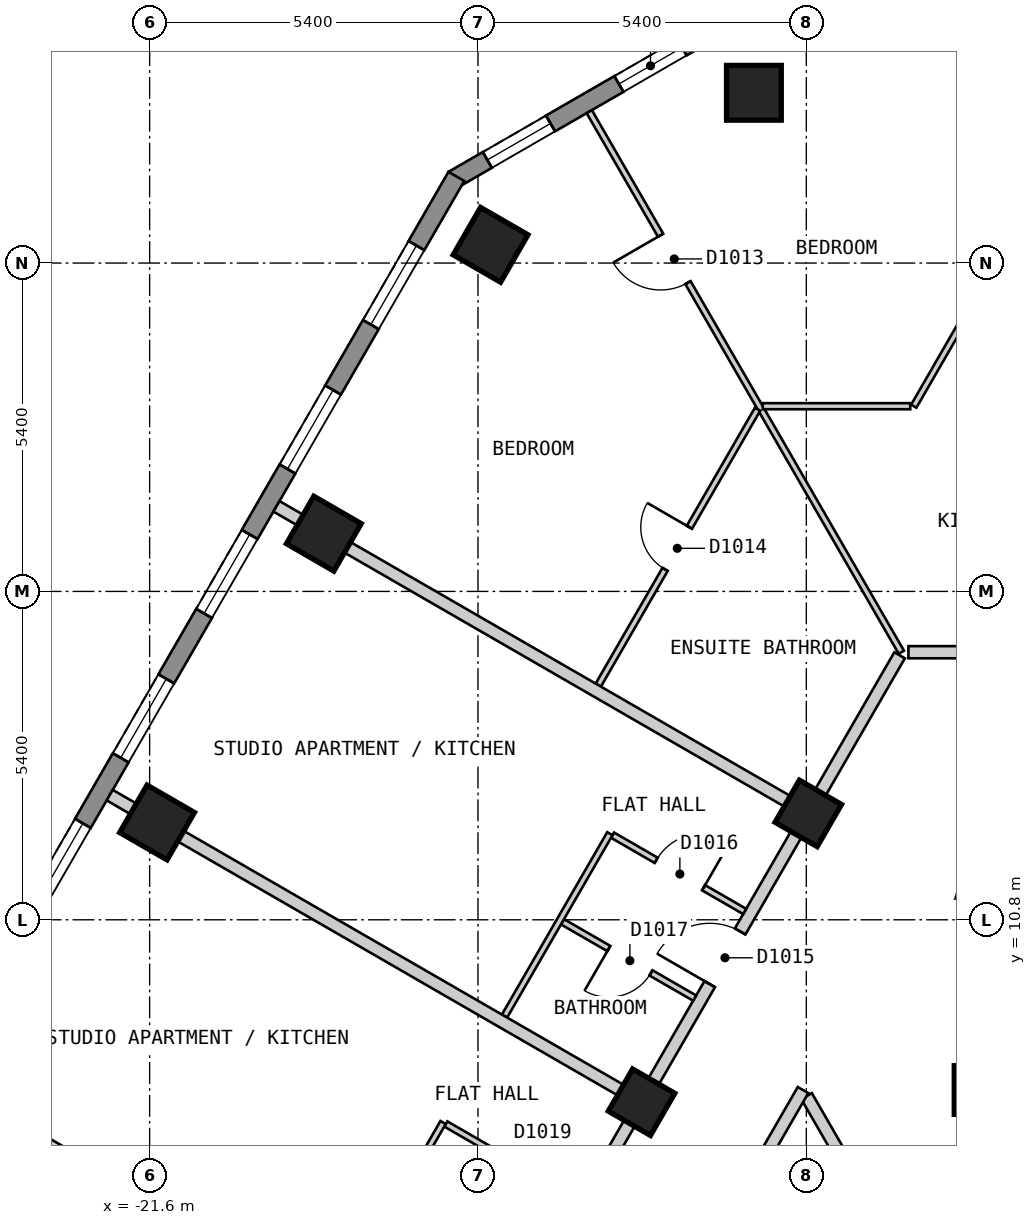
"""IFC4 building model, lengths in metres.
Left out: names, types, materials, properties, quantities, classifications, styles, units other than length and angle.
Written with IfcOpenShell. Run it as: python <this file> out.ifc"""

import sys

from ifc_helpers import new_model, si_unit, direction, frame, frame_2d, origin, origin_2d, place, context, subcontext, project, spatial, polyline, rectangle, outline, extrude, element, fill, save


model = new_model("IFC4")
c1 = context("Model", 3, precision=1e-05, world=origin(), true_north=direction((0.0, 1.0)))
c2 = subcontext(c1, "Body", "Model", "MODEL_VIEW")
j1 = project(units=[si_unit("LENGTHUNIT", "METRE"), si_unit("PLANEANGLEUNIT", "RADIAN")], contexts=[c1])
p1 = place(None, origin())
s1 = spatial("IfcSite", under=j1, at=p1, CompositionType="ELEMENT")
p2 = place(p1, origin())
s2 = spatial("IfcBuilding", under=s1, at=p2, CompositionType="ELEMENT")
p3 = place(p2, frame((0.0, 0.0, 120.6)))
s3 = spatial("IfcBuildingStorey", under=s2, at=p3, CompositionType="ELEMENT", Elevation=120.6)
for number, where, z_axis, x_axis in (
    (1, (-11.662, 24.4, 0.0), (0.0, 0.0, 1.0), (-1.0, 0.0, 0.0)),
    (2, (-15.993, 21.9, 0.0), (0.0, 0.0, 1.0), (-0.5, -0.866, 0.0)),
    (3, (-18.735, 17.15, 0.0), (0.0, 0.0, 1.0), (-0.5, -0.866, 0.0)),
    (4, (-21.478, 12.4, 0.0), (0.0, 0.0, 1.0), (-0.5, -0.866, 0.0)),
):
    element("IfcColumn", number, at=place(p3, frame(where, z_axis=z_axis, x_axis=x_axis)), inside=s3, PredefinedType="COLUMN", context=c2, shape_type="SweptSolid", body=[
        extrude(rectangle(XDim=0.9, YDim=0.9, at=origin_2d()), origin(), (0.0, 0.0, 1.0), 3.0),
    ])
for number, where, z_axis, x_axis in (
    (5, (-10.768, 12.55, 0.0), (0.0, 0.0, 1.0), (-0.5, -0.866, 0.0)),
    (6, (-7.967, 8.0, 0.0), (0.0, 0.0, 1.0), (1.0, 0.0, 0.0)),
    (7, (-13.51, 7.8, 0.0), (0.0, 0.0, 1.0), (-0.5, -0.866, 0.0)),
):
    element("IfcColumn", number, at=place(p3, frame(where, z_axis=z_axis, x_axis=x_axis)), inside=s3, PredefinedType="COLUMN", context=c2, shape_type="SweptSolid", body=[
        extrude(rectangle(XDim=0.8, YDim=0.8, at=origin_2d()), origin(), (0.0, 0.0, 1.0), 3.0),
    ])
p4 = place(p3, frame((-12.28, 25.47, 0.0), z_axis=(0.0, 0.0, 1.0), x_axis=(-0.866022959057, -0.500004234368, 0.0)))
e8 = element("IfcWall", 8, at=p4, inside=s3, PredefinedType="SOLIDWALL", context=c2, shape_type="SweptSolid", body=[
    extrude(outline(polyline([(0.0, -0.15), (5.0, -0.15), (4.92, 0.15), (0.08, 0.15), (0.0, -0.15)])), origin(), (0.0, 0.0, 1.0), 2.7),
])
p5 = place(p4, frame((0.65, 0.0, 0.15)))
e9 = element("IfcOpeningElement", 9, at=p5, cuts=e8, PredefinedType="OPENING", context=c2, shape_type="SweptSolid", body=[
    extrude(rectangle(XDim=1.2, YDim=2.1, at=frame_2d((0.6, 1.05))), frame((0.0, 0.16, 0.0), z_axis=(0.0, -1.0, 0.0), x_axis=(1.0, 0.0, 0.0)), (0.0, 0.0, 1.0), 0.32),
])
p6 = place(p4, frame((3.149, 0.0, 0.15)))
e10 = element("IfcOpeningElement", 10, at=p6, cuts=e8, PredefinedType="OPENING", context=c2, shape_type="SweptSolid", body=[
    extrude(rectangle(XDim=1.2, YDim=2.1, at=frame_2d((0.6, 1.05))), frame((0.0, 0.16, 0.0), z_axis=(0.0, -1.0, 0.0), x_axis=(1.0, 0.0, 0.0)), (0.0, 0.0, 1.0), 0.32),
])
p7 = place(p3, frame((-16.555, 23.025, 0.0), z_axis=(0.0, 0.0, 1.0), x_axis=(-0.500020536353, -0.866013546791, 0.0)))
e11 = element("IfcWall", 11, at=p7, inside=s3, PredefinedType="SOLIDWALL", context=c2, shape_type="SweptSolid", body=[
    extrude(outline(polyline([(0.0, -0.15), (23.325, -0.15), (23.245, 0.15), (0.08, 0.15), (0.0, -0.15)])), origin(), (0.0, 0.0, 1.0), 2.7),
])
p8 = place(p7, frame((1.314, 0.0, 0.15)))
e12 = element("IfcOpeningElement", 12, at=p8, cuts=e11, PredefinedType="OPENING", context=c2, shape_type="SweptSolid", body=[
    extrude(rectangle(XDim=1.5, YDim=2.1, at=frame_2d((0.75, 1.05))), frame((0.0, 0.16, 0.0), z_axis=(0.0, -1.0, 0.0), x_axis=(1.0, 0.0, 0.0)), (0.0, 0.0, 1.0), 0.32),
])
p9 = place(p7, frame((4.056, 0.0, 0.15)))
e13 = element("IfcOpeningElement", 13, at=p9, cuts=e11, PredefinedType="OPENING", context=c2, shape_type="SweptSolid", body=[
    extrude(rectangle(XDim=1.5, YDim=2.1, at=frame_2d((0.75, 1.05))), frame((0.0, 0.16, 0.0), z_axis=(0.0, -1.0, 0.0), x_axis=(1.0, 0.0, 0.0)), (0.0, 0.0, 1.0), 0.32),
])
p10 = place(p7, frame((6.799, 0.0, 0.15)))
e14 = element("IfcOpeningElement", 14, at=p10, cuts=e11, PredefinedType="OPENING", context=c2, shape_type="SweptSolid", body=[
    extrude(rectangle(XDim=1.5, YDim=2.1, at=frame_2d((0.75, 1.05))), frame((0.0, 0.16, 0.0), z_axis=(0.0, -1.0, 0.0), x_axis=(1.0, 0.0, 0.0)), (0.0, 0.0, 1.0), 0.32),
])
p11 = place(p7, frame((9.541, 0.0, 0.15)))
e15 = element("IfcOpeningElement", 15, at=p11, cuts=e11, PredefinedType="OPENING", context=c2, shape_type="SweptSolid", body=[
    extrude(rectangle(XDim=1.5, YDim=2.1, at=frame_2d((0.75, 1.05))), frame((0.0, 0.16, 0.0), z_axis=(0.0, -1.0, 0.0), x_axis=(1.0, 0.0, 0.0)), (0.0, 0.0, 1.0), 0.32),
])
p12 = place(p7, frame((12.285, 0.0, 0.15)))
e16 = element("IfcOpeningElement", 16, at=p12, cuts=e11, PredefinedType="OPENING", context=c2, shape_type="SweptSolid", body=[
    extrude(rectangle(XDim=1.5, YDim=2.1, at=frame_2d((0.75, 1.05))), frame((0.0, 0.16, 0.0), z_axis=(0.0, -1.0, 0.0), x_axis=(1.0, 0.0, 0.0)), (0.0, 0.0, 1.0), 0.32),
])
p13 = place(p7, frame((15.027, 0.0, 0.15)))
e17 = element("IfcOpeningElement", 17, at=p13, cuts=e11, PredefinedType="OPENING", context=c2, shape_type="SweptSolid", body=[
    extrude(rectangle(XDim=1.5, YDim=2.1, at=frame_2d((0.75, 1.05))), frame((0.0, 0.16, 0.0), z_axis=(0.0, -1.0, 0.0), x_axis=(1.0, 0.0, 0.0)), (0.0, 0.0, 1.0), 0.32),
])
p14 = place(p7, frame((17.769, 0.0, 0.15)))
e18 = element("IfcOpeningElement", 18, at=p14, cuts=e11, PredefinedType="OPENING", context=c2, shape_type="SweptSolid", body=[
    extrude(rectangle(XDim=1.5, YDim=2.1, at=frame_2d((0.75, 1.05))), frame((0.0, 0.16, 0.0), z_axis=(0.0, -1.0, 0.0), x_axis=(1.0, 0.0, 0.0)), (0.0, 0.0, 1.0), 0.32),
])
p15 = place(p7, frame((20.512, 0.0, 0.15)))
e19 = element("IfcOpeningElement", 19, at=p15, cuts=e11, PredefinedType="OPENING", context=c2, shape_type="SweptSolid", body=[
    extrude(rectangle(XDim=1.5, YDim=2.1, at=frame_2d((0.75, 1.05))), frame((0.0, 0.16, 0.0), z_axis=(0.0, -1.0, 0.0), x_axis=(1.0, 0.0, 0.0)), (0.0, 0.0, 1.0), 0.32),
])
p16 = place(p3, frame((-10.796, 7.9, 0.0), z_axis=(0.0, 0.0, 1.0), x_axis=(0.499954271211, -0.866051803703, 0.0)))
e20 = element("IfcWall", 20, at=p16, inside=s3, PredefinedType="PARTITIONING", context=c2, shape_type="SweptSolid", body=[
    extrude(rectangle(XDim=7.536, YDim=0.2, at=frame_2d((3.768, 0.0))), origin(), (0.0, 0.0, 1.0), 2.7),
])
p17 = place(p3, frame((-9.121, 15.2, 0.0), z_axis=(0.0, 0.0, 1.0), x_axis=(1.0, 0.0, 0.0)))
e21 = element("IfcWall", 21, at=p17, inside=s3, PredefinedType="PARTITIONING", context=c2, shape_type="SweptSolid", body=[
    extrude(rectangle(XDim=2.308, YDim=0.2, at=frame_2d((1.154, 0.0))), origin(), (0.0, 0.0, 1.0), 2.7),
])
p18 = place(p3, frame((-15.242, 0.399, 0.0), z_axis=(0.0, 0.0, 1.0), x_axis=(0.499953615651, 0.866052182145, 0.0)))
e22 = element("IfcWall", 22, at=p18, inside=s3, PredefinedType="PARTITIONING", context=c2, shape_type="SweptSolid", body=[
    extrude(rectangle(XDim=8.777, YDim=0.2, at=frame_2d((4.388, 0.0))), origin(), (0.0, 0.0, 1.0), 2.7),
])
p19 = place(p18, frame((3.938, 0.0, 0.0)))
e23 = element("IfcOpeningElement", 23, at=p19, cuts=e22, PredefinedType="OPENING", context=c2, shape_type="SweptSolid", body=[
    extrude(rectangle(XDim=0.9, YDim=2.1, at=frame_2d((0.45, 1.05))), frame((0.0, 0.11, 0.0), z_axis=(0.0, -1.0, 0.0), x_axis=(1.0, 0.0, 0.0)), (0.0, 0.0, 1.0), 0.22),
])
p20 = place(p3, frame((-17.753, 0.45, 0.0), z_axis=(0.0, 0.0, 1.0), x_axis=(0.499990970252, 0.866030617049, 0.0)))
e24 = element("IfcWall", 24, at=p20, inside=s3, PredefinedType="PARTITIONING", context=c2, shape_type="SweptSolid", body=[
    extrude(rectangle(XDim=16.974, YDim=0.2, at=frame_2d((8.487, 0.0))), origin(), (0.0, 0.0, 1.0), 2.7),
])
p21 = place(p20, frame((10.73, 0.0, 0.0)))
e25 = element("IfcOpeningElement", 25, at=p21, cuts=e24, PredefinedType="OPENING", context=c2, shape_type="SweptSolid", body=[
    extrude(rectangle(XDim=1.0, YDim=2.1, at=frame_2d((0.5, 1.05))), frame((0.0, 0.11, 0.0), z_axis=(0.0, -1.0, 0.0), x_axis=(1.0, 0.0, 0.0)), (0.0, 0.0, 1.0), 0.22),
])
p22 = place(p20, frame((5.245, 0.0, 0.0)))
e26 = element("IfcOpeningElement", 26, at=p22, cuts=e24, PredefinedType="OPENING", context=c2, shape_type="SweptSolid", body=[
    extrude(rectangle(XDim=1.0, YDim=2.1, at=frame_2d((0.5, 1.05))), frame((0.0, 0.11, 0.0), z_axis=(0.0, -1.0, 0.0), x_axis=(1.0, 0.0, 0.0)), (0.0, 0.0, 1.0), 0.22),
])
p23 = place(p20, frame((0.594, 0.0, 0.0)))
e27 = element("IfcOpeningElement", 27, at=p23, cuts=e24, PredefinedType="OPENING", context=c2, shape_type="SweptSolid", body=[
    extrude(rectangle(XDim=1.0, YDim=2.1, at=frame_2d((0.5, 1.05))), frame((0.0, 0.11, 0.0), z_axis=(0.0, -1.0, 0.0), x_axis=(1.0, 0.0, 0.0)), (0.0, 0.0, 1.0), 0.22),
])
p24 = place(p3, frame((-14.37, 24.09, 0.0), z_axis=(0.0, 0.0, 1.0), x_axis=(0.50002438799, -0.866011322914, 0.0)))
e28 = element("IfcWall", 28, at=p24, inside=s3, PredefinedType="PARTITIONING", context=c2, shape_type="SweptSolid", body=[
    extrude(rectangle(XDim=10.266, YDim=0.1, at=frame_2d((5.133, 0.0))), origin(), (0.0, 0.0, 1.0), 2.7),
])
p25 = place(p24, frame((2.347, 0.0, 0.0)))
e29 = element("IfcOpeningElement", 29, at=p25, cuts=e28, PredefinedType="OPENING", context=c2, shape_type="SweptSolid", body=[
    extrude(rectangle(XDim=0.9, YDim=2.1, at=frame_2d((0.45, 1.05))), frame((0.0, 0.06, 0.0), z_axis=(0.0, -1.0, 0.0), x_axis=(1.0, 0.0, 0.0)), (0.0, 0.0, 1.0), 0.12),
])
p26 = place(p3, frame((-16.729, 7.442, 0.0), z_axis=(0.0, 0.0, 1.0), x_axis=(0.865983051302, -0.500073349477, 0.0)))
e30 = element("IfcWall", 30, at=p26, inside=s3, PredefinedType="PARTITIONING", context=c2, shape_type="SweptSolid", body=[
    extrude(rectangle(XDim=2.509, YDim=0.1, at=frame_2d((1.255, 0.0))), origin(), (0.0, 0.0, 1.0), 2.7),
])
p27 = place(p26, frame((0.829, 0.0, 0.0)))
e31 = element("IfcOpeningElement", 31, at=p27, cuts=e30, PredefinedType="OPENING", context=c2, shape_type="SweptSolid", body=[
    extrude(rectangle(XDim=0.9, YDim=2.1, at=frame_2d((0.45, 1.05))), frame((0.0, 0.06, 0.0), z_axis=(0.0, -1.0, 0.0), x_axis=(1.0, 0.0, 0.0)), (0.0, 0.0, 1.0), 0.12),
])
p28 = place(p3, frame((-13.987, 12.192, 0.0), z_axis=(0.0, 0.0, 1.0), x_axis=(0.865983051302, -0.500073349477, 0.0)))
e32 = element("IfcWall", 32, at=p28, inside=s3, PredefinedType="PARTITIONING", context=c2, shape_type="SweptSolid", body=[
    extrude(rectangle(XDim=2.509, YDim=0.1, at=frame_2d((1.255, 0.0))), origin(), (0.0, 0.0, 1.0), 2.7),
])
p29 = place(p28, frame((0.829, 0.0, 0.0)))
e33 = element("IfcOpeningElement", 33, at=p29, cuts=e32, PredefinedType="OPENING", context=c2, shape_type="SweptSolid", body=[
    extrude(rectangle(XDim=0.9, YDim=2.1, at=frame_2d((0.45, 1.05))), frame((0.0, 0.06, 0.0), z_axis=(0.0, -1.0, 0.0), x_axis=(1.0, 0.0, 0.0)), (0.0, 0.0, 1.0), 0.12),
])
p30 = place(p3, frame((-14.81, 10.767, 0.0), z_axis=(0.0, 0.0, 1.0), x_axis=(0.866038211682, -0.499977815414, 0.0)))
e34 = element("IfcWall", 34, at=p30, inside=s3, PredefinedType="PARTITIONING", context=c2, shape_type="SweptSolid", body=[
    extrude(rectangle(XDim=2.51, YDim=0.1, at=frame_2d((1.255, 0.0))), origin(), (0.0, 0.0, 1.0), 2.7),
])
p31 = place(p30, frame((0.88, 0.0, 0.0)))
e35 = element("IfcOpeningElement", 35, at=p31, cuts=e34, PredefinedType="OPENING", context=c2, shape_type="SweptSolid", body=[
    extrude(rectangle(XDim=0.8, YDim=2.1, at=frame_2d((0.4, 1.05))), frame((0.0, 0.06, 0.0), z_axis=(0.0, -1.0, 0.0), x_axis=(1.0, 0.0, 0.0)), (0.0, 0.0, 1.0), 0.12),
])
p32 = place(p3, frame((-11.516, 19.246, 0.0), z_axis=(0.0, 0.0, 1.0), x_axis=(1.0, 0.0, 0.0)))
e36 = element("IfcWall", 36, at=p32, inside=s3, PredefinedType="PARTITIONING", context=c2, shape_type="SweptSolid", body=[
    extrude(rectangle(XDim=2.425, YDim=0.1, at=frame_2d((1.212, 0.0))), origin(), (0.0, 0.0, 1.0), 2.7),
])
p33 = place(p3, frame((-9.033, 19.246, 0.0), z_axis=(0.0, 0.0, 1.0), x_axis=(0.499963722229, 0.866046347752, 0.0)))
e37 = element("IfcWall", 37, at=p33, inside=s3, PredefinedType="PARTITIONING", context=c2, shape_type="SweptSolid", body=[
    extrude(rectangle(XDim=2.54, YDim=0.1, at=frame_2d((1.27, 0.0))), origin(), (0.0, 0.0, 1.0), 2.7),
])
p34 = place(p3, frame((-18.506, 4.466, 0.0), z_axis=(0.0, 0.0, 1.0), x_axis=(0.500027479704, 0.866009537788, 0.0)))
e38 = element("IfcWall", 38, at=p34, inside=s3, PredefinedType="PARTITIONING", context=c2, shape_type="SweptSolid", body=[
    extrude(rectangle(XDim=3.464, YDim=0.1, at=frame_2d((1.732, 0.0))), origin(), (0.0, 0.0, 1.0), 2.7),
])
p35 = place(p3, frame((-15.763, 9.217, 0.0), z_axis=(0.0, 0.0, 1.0), x_axis=(0.500096714907, 0.865969558206, 0.0)))
e39 = element("IfcWall", 39, at=p35, inside=s3, PredefinedType="PARTITIONING", context=c2, shape_type="SweptSolid", body=[
    extrude(rectangle(XDim=3.463, YDim=0.1, at=frame_2d((1.731, 0.0))), origin(), (0.0, 0.0, 1.0), 2.7),
])
p36 = place(p3, frame((-14.222, 14.659, 0.0), z_axis=(0.0, 0.0, 1.0), x_axis=(0.500053212623, 0.865994679283, 0.0)))
e40 = element("IfcWall", 40, at=p36, inside=s3, PredefinedType="PARTITIONING", context=c2, shape_type="SweptSolid", body=[
    extrude(rectangle(XDim=5.239, YDim=0.1, at=frame_2d((2.62, 0.0))), origin(), (0.0, 0.0, 1.0), 2.7),
])
p37 = place(p36, frame((2.198, 0.0, 0.0)))
e41 = element("IfcOpeningElement", 41, at=p37, cuts=e40, PredefinedType="OPENING", context=c2, shape_type="SweptSolid", body=[
    extrude(rectangle(XDim=0.8, YDim=2.1, at=frame_2d((0.4, 1.05))), frame((0.0, 0.06, 0.0), z_axis=(0.0, -1.0, 0.0), x_axis=(1.0, 0.0, 0.0)), (0.0, 0.0, 1.0), 0.12),
])
p38 = place(p3, frame((-24.999, 8.1, 0.0), z_axis=(0.0, 0.0, 1.0), x_axis=(0.866016855193, -0.500014806302, 0.0)))
e42 = element("IfcWall", 42, at=p38, inside=s3, PredefinedType="PARTITIONING", context=c2, shape_type="SweptSolid", body=[
    extrude(rectangle(XDim=10.0, YDim=0.2, at=frame_2d((5.0, 0.0))), origin(), (0.0, 0.0, 1.0), 2.7),
])
p39 = place(p3, frame((-22.257, 12.85, 0.0), z_axis=(0.0, 0.0, 1.0), x_axis=(0.866047370643, -0.499961950354, 0.0)))
e43 = element("IfcWall", 43, at=p39, inside=s3, PredefinedType="PARTITIONING", context=c2, shape_type="SweptSolid", body=[
    extrude(rectangle(XDim=10.001, YDim=0.2, at=frame_2d((5.0, 0.0))), origin(), (0.0, 0.0, 1.0), 2.7),
])
p40 = place(p3, frame((-19.514, 17.599, 0.0), z_axis=(0.0, 0.0, 1.0), x_axis=(0.866059142644, -0.499941558027, 0.0)))
e44 = element("IfcWall", 44, at=p40, inside=s3, PredefinedType="PARTITIONING", context=c2, shape_type="SweptSolid", body=[
    extrude(rectangle(XDim=9.999, YDim=0.2, at=frame_2d((5.0, 0.0))), origin(), (0.0, 0.0, 1.0), 2.7),
])
p41 = place(p5, origin())
e45 = element("IfcWindow", 45, at=p41, inside=s3, PartitioningType="SINGLE_PANEL", PredefinedType="WINDOW", context=c2, shape_type="SweptSolid", body=[
    extrude(rectangle(XDim=1.2, YDim=2.1, at=frame_2d((0.6, 1.05))), frame((0.0, 0.03, 0.0), z_axis=(0.0, -1.0, 0.0), x_axis=(1.0, 0.0, 0.0)), (0.0, 0.0, 1.0), 0.06),
])
fill(e9, e45)
p42 = place(p6, origin())
e46 = element("IfcWindow", 46, at=p42, inside=s3, PartitioningType="SINGLE_PANEL", PredefinedType="WINDOW", context=c2, shape_type="SweptSolid", body=[
    extrude(rectangle(XDim=1.2, YDim=2.1, at=frame_2d((0.6, 1.05))), frame((0.0, 0.03, 0.0), z_axis=(0.0, -1.0, 0.0), x_axis=(1.0, 0.0, 0.0)), (0.0, 0.0, 1.0), 0.06),
])
fill(e10, e46)
p43 = place(p8, origin())
e47 = element("IfcWindow", 47, at=p43, inside=s3, PartitioningType="SINGLE_PANEL", PredefinedType="WINDOW", context=c2, shape_type="SweptSolid", body=[
    extrude(rectangle(XDim=1.5, YDim=2.1, at=frame_2d((0.75, 1.05))), frame((0.0, 0.03, 0.0), z_axis=(0.0, -1.0, 0.0), x_axis=(1.0, 0.0, 0.0)), (0.0, 0.0, 1.0), 0.06),
])
fill(e12, e47)
p44 = place(p9, origin())
e48 = element("IfcWindow", 48, at=p44, inside=s3, PartitioningType="SINGLE_PANEL", PredefinedType="WINDOW", context=c2, shape_type="SweptSolid", body=[
    extrude(rectangle(XDim=1.5, YDim=2.1, at=frame_2d((0.75, 1.05))), frame((0.0, 0.03, 0.0), z_axis=(0.0, -1.0, 0.0), x_axis=(1.0, 0.0, 0.0)), (0.0, 0.0, 1.0), 0.06),
])
fill(e13, e48)
p45 = place(p10, origin())
e49 = element("IfcWindow", 49, at=p45, inside=s3, PartitioningType="SINGLE_PANEL", PredefinedType="WINDOW", context=c2, shape_type="SweptSolid", body=[
    extrude(rectangle(XDim=1.5, YDim=2.1, at=frame_2d((0.75, 1.05))), frame((0.0, 0.03, 0.0), z_axis=(0.0, -1.0, 0.0), x_axis=(1.0, 0.0, 0.0)), (0.0, 0.0, 1.0), 0.06),
])
fill(e14, e49)
p46 = place(p11, origin())
e50 = element("IfcWindow", 50, at=p46, inside=s3, PartitioningType="SINGLE_PANEL", PredefinedType="WINDOW", context=c2, shape_type="SweptSolid", body=[
    extrude(rectangle(XDim=1.5, YDim=2.1, at=frame_2d((0.75, 1.05))), frame((0.0, 0.03, 0.0), z_axis=(0.0, -1.0, 0.0), x_axis=(1.0, 0.0, 0.0)), (0.0, 0.0, 1.0), 0.06),
])
fill(e15, e50)
p47 = place(p12, origin())
e51 = element("IfcWindow", 51, at=p47, inside=s3, PartitioningType="SINGLE_PANEL", PredefinedType="WINDOW", context=c2, shape_type="SweptSolid", body=[
    extrude(rectangle(XDim=1.5, YDim=2.1, at=frame_2d((0.75, 1.05))), frame((0.0, 0.03, 0.0), z_axis=(0.0, -1.0, 0.0), x_axis=(1.0, 0.0, 0.0)), (0.0, 0.0, 1.0), 0.06),
])
fill(e16, e51)
p48 = place(p25, origin())
e52 = element("IfcDoor", 52, at=p48, inside=s3, OperationType="SINGLE_SWING_LEFT", PredefinedType="DOOR", context=c2, shape_type="SweptSolid", body=[
    extrude(rectangle(XDim=0.9, YDim=2.1, at=frame_2d((0.45, 1.05))), frame((0.0, 0.025, 0.0), z_axis=(0.0, -1.0, 0.0), x_axis=(1.0, 0.0, 0.0)), (0.0, 0.0, 1.0), 0.05),
])
fill(e29, e52)
p49 = place(p37, origin())
e53 = element("IfcDoor", 53, at=p49, inside=s3, OperationType="SINGLE_SWING_RIGHT", PredefinedType="DOOR", context=c2, shape_type="SweptSolid", body=[
    extrude(rectangle(XDim=0.8, YDim=2.1, at=frame_2d((0.4, 1.05))), frame((0.0, 0.025, 0.0), z_axis=(0.0, -1.0, 0.0), x_axis=(1.0, 0.0, 0.0)), (0.0, 0.0, 1.0), 0.05),
])
fill(e41, e53)
p50 = place(p21, origin())
e54 = element("IfcDoor", 54, at=p50, inside=s3, OperationType="SINGLE_SWING_LEFT", PredefinedType="DOOR", context=c2, shape_type="SweptSolid", body=[
    extrude(rectangle(XDim=1.0, YDim=2.1, at=frame_2d((0.5, 1.05))), frame((0.0, 0.025, 0.0), z_axis=(0.0, -1.0, 0.0), x_axis=(1.0, 0.0, 0.0)), (0.0, 0.0, 1.0), 0.05),
])
fill(e25, e54)
p51 = place(p29, origin())
e55 = element("IfcDoor", 55, at=p51, inside=s3, OperationType="SINGLE_SWING_RIGHT", PredefinedType="DOOR", context=c2, shape_type="SweptSolid", body=[
    extrude(rectangle(XDim=0.9, YDim=2.1, at=frame_2d((0.45, 1.05))), frame((0.0, 0.025, 0.0), z_axis=(0.0, -1.0, 0.0), x_axis=(1.0, 0.0, 0.0)), (0.0, 0.0, 1.0), 0.05),
])
fill(e33, e55)
p52 = place(p31, origin())
e56 = element("IfcDoor", 56, at=p52, inside=s3, OperationType="SINGLE_SWING_LEFT", PredefinedType="DOOR", context=c2, shape_type="SweptSolid", body=[
    extrude(rectangle(XDim=0.8, YDim=2.1, at=frame_2d((0.4, 1.05))), frame((0.0, 0.025, 0.0), z_axis=(0.0, -1.0, 0.0), x_axis=(1.0, 0.0, 0.0)), (0.0, 0.0, 1.0), 0.05),
])
fill(e35, e56)
save(model, sys.argv[1])
